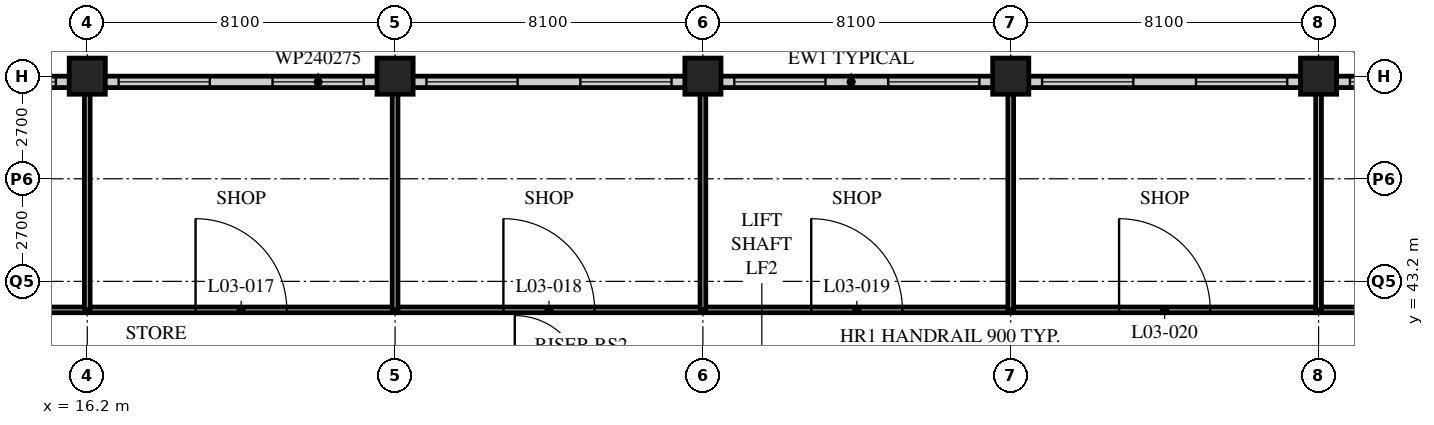
"""IFC4 building model, lengths in metres.
Left out: names, types, materials, properties, quantities, classifications, styles, units other than length and angle.
Written with IfcOpenShell. Run it as: python <this file> out.ifc"""

import sys

from ifc_helpers import new_model, si_unit, direction, frame, frame_2d, origin, origin_2d, place, context, subcontext, project, spatial, rectangle, hollow_rectangle, extrude, element, fill, save


model = new_model("IFC4")
c1 = context("Model", 3, precision=1e-05, world=origin(), true_north=direction((0.0, 1.0)))
c2 = subcontext(c1, "Body", "Model", "MODEL_VIEW")
j1 = project(units=[si_unit("LENGTHUNIT", "METRE"), si_unit("PLANEANGLEUNIT", "RADIAN")], contexts=[c1])
p1 = place(None, origin())
s1 = spatial("IfcSite", under=j1, at=p1, CompositionType="ELEMENT")
p2 = place(p1, origin())
s2 = spatial("IfcBuilding", under=s1, at=p2, CompositionType="ELEMENT")
p3 = place(p2, frame((0.0, 0.0, 16.8)))
s3 = spatial("IfcBuildingStorey", under=s2, at=p3, CompositionType="ELEMENT", Elevation=16.8)
for number, where, z_axis, x_axis in (
    (1, (16.2, 48.6, 0.0), (0.0, 0.0, 1.0), (1.0, 0.0, 0.0)),
    (2, (24.3, 48.6, 0.0), (0.0, 0.0, 1.0), (1.0, 0.0, 0.0)),
    (3, (32.4, 48.6, 0.0), (0.0, 0.0, 1.0), (1.0, 0.0, 0.0)),
    (4, (40.5, 48.6, 0.0), (0.0, 0.0, 1.0), (1.0, 0.0, 0.0)),
    (5, (48.6, 48.6, 0.0), (0.0, 0.0, 1.0), (1.0, 0.0, 0.0)),
):
    element("IfcColumn", number, at=place(p3, frame(where, z_axis=z_axis, x_axis=x_axis)), inside=s3, PredefinedType="COLUMN", context=c2, shape_type="SweptSolid", body=[
        extrude(hollow_rectangle(XDim=0.95, YDim=0.95, WallThickness=0.1, at=origin_2d()), origin(), (0.0, 0.0, 1.0), 5.4),
    ])
p4 = place(p3, frame((64.5, 48.45, 0.0), z_axis=(0.0, 0.0, 1.0), x_axis=(-1.0, 0.0, 0.0)))
e6 = element("IfcWall", 6, at=p4, inside=s3, PredefinedType="SOLIDWALL", context=c2, shape_type="SweptSolid", body=[
    extrude(rectangle(XDim=56.4, YDim=0.3, at=frame_2d((28.2, 0.0))), origin(), (0.0, 0.0, 1.0), 5.15),
])
p5 = place(p4, frame((0.525, 0.0, 1.0)))
e7 = element("IfcOpeningElement", 7, at=p5, cuts=e6, PredefinedType="OPENING", context=c2, shape_type="SweptSolid", body=[
    extrude(rectangle(XDim=2.4, YDim=2.75, at=frame_2d((1.2, 1.375))), frame((0.0, 0.16, 0.0), z_axis=(0.0, -1.0, 0.0), x_axis=(1.0, 0.0, 0.0)), (0.0, 0.0, 1.0), 0.32),
])
p6 = place(p4, frame((4.575, 0.0, 1.0)))
e8 = element("IfcOpeningElement", 8, at=p6, cuts=e6, PredefinedType="OPENING", context=c2, shape_type="SweptSolid", body=[
    extrude(rectangle(XDim=2.4, YDim=2.75, at=frame_2d((1.2, 1.375))), frame((0.0, 0.16, 0.0), z_axis=(0.0, -1.0, 0.0), x_axis=(1.0, 0.0, 0.0)), (0.0, 0.0, 1.0), 0.32),
])
p7 = place(p4, frame((8.625, 0.0, 1.0)))
e9 = element("IfcOpeningElement", 9, at=p7, cuts=e6, PredefinedType="OPENING", context=c2, shape_type="SweptSolid", body=[
    extrude(rectangle(XDim=2.4, YDim=2.75, at=frame_2d((1.2, 1.375))), frame((0.0, 0.16, 0.0), z_axis=(0.0, -1.0, 0.0), x_axis=(1.0, 0.0, 0.0)), (0.0, 0.0, 1.0), 0.32),
])
p8 = place(p4, frame((12.675, 0.0, 1.0)))
e10 = element("IfcOpeningElement", 10, at=p8, cuts=e6, PredefinedType="OPENING", context=c2, shape_type="SweptSolid", body=[
    extrude(rectangle(XDim=2.4, YDim=2.75, at=frame_2d((1.2, 1.375))), frame((0.0, 0.16, 0.0), z_axis=(0.0, -1.0, 0.0), x_axis=(1.0, 0.0, 0.0)), (0.0, 0.0, 1.0), 0.32),
])
p9 = place(p4, frame((16.725, 0.0, 1.0)))
e11 = element("IfcOpeningElement", 11, at=p9, cuts=e6, PredefinedType="OPENING", context=c2, shape_type="SweptSolid", body=[
    extrude(rectangle(XDim=2.4, YDim=2.75, at=frame_2d((1.2, 1.375))), frame((0.0, 0.16, 0.0), z_axis=(0.0, -1.0, 0.0), x_axis=(1.0, 0.0, 0.0)), (0.0, 0.0, 1.0), 0.32),
])
p10 = place(p4, frame((20.775, 0.0, 1.0)))
e12 = element("IfcOpeningElement", 12, at=p10, cuts=e6, PredefinedType="OPENING", context=c2, shape_type="SweptSolid", body=[
    extrude(rectangle(XDim=2.4, YDim=2.75, at=frame_2d((1.2, 1.375))), frame((0.0, 0.16, 0.0), z_axis=(0.0, -1.0, 0.0), x_axis=(1.0, 0.0, 0.0)), (0.0, 0.0, 1.0), 0.32),
])
p11 = place(p4, frame((24.825, 0.0, 1.0)))
e13 = element("IfcOpeningElement", 13, at=p11, cuts=e6, PredefinedType="OPENING", context=c2, shape_type="SweptSolid", body=[
    extrude(rectangle(XDim=2.4, YDim=2.75, at=frame_2d((1.2, 1.375))), frame((0.0, 0.16, 0.0), z_axis=(0.0, -1.0, 0.0), x_axis=(1.0, 0.0, 0.0)), (0.0, 0.0, 1.0), 0.32),
])
p12 = place(p4, frame((28.875, 0.0, 1.0)))
e14 = element("IfcOpeningElement", 14, at=p12, cuts=e6, PredefinedType="OPENING", context=c2, shape_type="SweptSolid", body=[
    extrude(rectangle(XDim=2.4, YDim=2.75, at=frame_2d((1.2, 1.375))), frame((0.0, 0.16, 0.0), z_axis=(0.0, -1.0, 0.0), x_axis=(1.0, 0.0, 0.0)), (0.0, 0.0, 1.0), 0.32),
])
p13 = place(p4, frame((32.925, 0.0, 1.0)))
e15 = element("IfcOpeningElement", 15, at=p13, cuts=e6, PredefinedType="OPENING", context=c2, shape_type="SweptSolid", body=[
    extrude(rectangle(XDim=2.4, YDim=2.75, at=frame_2d((1.2, 1.375))), frame((0.0, 0.16, 0.0), z_axis=(0.0, -1.0, 0.0), x_axis=(1.0, 0.0, 0.0)), (0.0, 0.0, 1.0), 0.32),
])
p14 = place(p4, frame((36.975, 0.0, 1.0)))
e16 = element("IfcOpeningElement", 16, at=p14, cuts=e6, PredefinedType="OPENING", context=c2, shape_type="SweptSolid", body=[
    extrude(rectangle(XDim=2.4, YDim=2.75, at=frame_2d((1.2, 1.375))), frame((0.0, 0.16, 0.0), z_axis=(0.0, -1.0, 0.0), x_axis=(1.0, 0.0, 0.0)), (0.0, 0.0, 1.0), 0.32),
])
p15 = place(p4, frame((41.025, 0.0, 1.0)))
e17 = element("IfcOpeningElement", 17, at=p15, cuts=e6, PredefinedType="OPENING", context=c2, shape_type="SweptSolid", body=[
    extrude(rectangle(XDim=2.4, YDim=2.75, at=frame_2d((1.2, 1.375))), frame((0.0, 0.16, 0.0), z_axis=(0.0, -1.0, 0.0), x_axis=(1.0, 0.0, 0.0)), (0.0, 0.0, 1.0), 0.32),
])
p16 = place(p4, frame((45.075, 0.0, 1.0)))
e18 = element("IfcOpeningElement", 18, at=p16, cuts=e6, PredefinedType="OPENING", context=c2, shape_type="SweptSolid", body=[
    extrude(rectangle(XDim=2.4, YDim=2.75, at=frame_2d((1.2, 1.375))), frame((0.0, 0.16, 0.0), z_axis=(0.0, -1.0, 0.0), x_axis=(1.0, 0.0, 0.0)), (0.0, 0.0, 1.0), 0.32),
])
p17 = place(p4, frame((49.125, 0.0, 1.0)))
e19 = element("IfcOpeningElement", 19, at=p17, cuts=e6, PredefinedType="OPENING", context=c2, shape_type="SweptSolid", body=[
    extrude(rectangle(XDim=2.4, YDim=2.75, at=frame_2d((1.2, 1.375))), frame((0.0, 0.16, 0.0), z_axis=(0.0, -1.0, 0.0), x_axis=(1.0, 0.0, 0.0)), (0.0, 0.0, 1.0), 0.32),
])
p18 = place(p4, frame((53.175, 0.0, 1.0)))
e20 = element("IfcOpeningElement", 20, at=p18, cuts=e6, PredefinedType="OPENING", context=c2, shape_type="SweptSolid", body=[
    extrude(rectangle(XDim=2.4, YDim=2.75, at=frame_2d((1.2, 1.375))), frame((0.0, 0.16, 0.0), z_axis=(0.0, -1.0, 0.0), x_axis=(1.0, 0.0, 0.0)), (0.0, 0.0, 1.0), 0.32),
])
p19 = place(p3, frame((8.1, 42.45, 0.0), z_axis=(0.0, 0.0, 1.0), x_axis=(1.0, 0.0, 0.0)))
e21 = element("IfcWall", 21, at=p19, inside=s3, PredefinedType="PARTITIONING", context=c2, shape_type="SweptSolid", body=[
    extrude(rectangle(XDim=48.6, YDim=0.15, at=frame_2d((24.3, 0.0))), origin(), (0.0, 0.0, 1.0), 5.15),
])
p20 = place(p19, frame((10.95, 0.0, 0.0)))
e22 = element("IfcOpeningElement", 22, at=p20, cuts=e21, PredefinedType="OPENING", context=c2, shape_type="SweptSolid", body=[
    extrude(rectangle(XDim=2.4, YDim=2.7, at=frame_2d((1.2, 1.35))), frame((0.0, 0.085, 0.0), z_axis=(0.0, -1.0, 0.0), x_axis=(1.0, 0.0, 0.0)), (0.0, 0.0, 1.0), 0.17),
])
p21 = place(p19, frame((19.05, 0.0, 0.0)))
e23 = element("IfcOpeningElement", 23, at=p21, cuts=e21, PredefinedType="OPENING", context=c2, shape_type="SweptSolid", body=[
    extrude(rectangle(XDim=2.4, YDim=2.7, at=frame_2d((1.2, 1.35))), frame((0.0, 0.085, 0.0), z_axis=(0.0, -1.0, 0.0), x_axis=(1.0, 0.0, 0.0)), (0.0, 0.0, 1.0), 0.17),
])
p22 = place(p19, frame((27.15, 0.0, 0.0)))
e24 = element("IfcOpeningElement", 24, at=p22, cuts=e21, PredefinedType="OPENING", context=c2, shape_type="SweptSolid", body=[
    extrude(rectangle(XDim=2.4, YDim=2.7, at=frame_2d((1.2, 1.35))), frame((0.0, 0.085, 0.0), z_axis=(0.0, -1.0, 0.0), x_axis=(1.0, 0.0, 0.0)), (0.0, 0.0, 1.0), 0.17),
])
p23 = place(p19, frame((35.25, 0.0, 0.0)))
e25 = element("IfcOpeningElement", 25, at=p23, cuts=e21, PredefinedType="OPENING", context=c2, shape_type="SweptSolid", body=[
    extrude(rectangle(XDim=2.4, YDim=2.7, at=frame_2d((1.2, 1.35))), frame((0.0, 0.085, 0.0), z_axis=(0.0, -1.0, 0.0), x_axis=(1.0, 0.0, 0.0)), (0.0, 0.0, 1.0), 0.17),
])
p24 = place(p19, frame((43.35, 0.0, 0.0)))
e26 = element("IfcOpeningElement", 26, at=p24, cuts=e21, PredefinedType="OPENING", context=c2, shape_type="SweptSolid", body=[
    extrude(rectangle(XDim=2.4, YDim=2.7, at=frame_2d((1.2, 1.35))), frame((0.0, 0.085, 0.0), z_axis=(0.0, -1.0, 0.0), x_axis=(1.0, 0.0, 0.0)), (0.0, 0.0, 1.0), 0.17),
])
p25 = place(p19, frame((2.85, 0.0, 0.0)))
e27 = element("IfcOpeningElement", 27, at=p25, cuts=e21, PredefinedType="OPENING", context=c2, shape_type="SweptSolid", body=[
    extrude(rectangle(XDim=2.4, YDim=2.7, at=frame_2d((1.2, 1.35))), frame((0.0, 0.085, 0.0), z_axis=(0.0, -1.0, 0.0), x_axis=(1.0, 0.0, 0.0)), (0.0, 0.0, 1.0), 0.17),
])
for number, where, z_axis, x_axis in (
    (28, (24.3, 42.45, 0.0), (0.0, 0.0, 1.0), (0.0, 1.0, 0.0)),
    (29, (32.4, 42.45, 0.0), (0.0, 0.0, 1.0), (0.0, 1.0, 0.0)),
    (30, (40.5, 42.45, 0.0), (0.0, 0.0, 1.0), (0.0, 1.0, 0.0)),
    (31, (48.6, 42.45, 0.0), (0.0, 0.0, 1.0), (0.0, 1.0, 0.0)),
    (32, (16.2, 42.45, 0.0), (0.0, 0.0, 1.0), (0.0, 1.0, 0.0)),
):
    element("IfcWall", number, at=place(p3, frame(where, z_axis=z_axis, x_axis=x_axis)), inside=s3, PredefinedType="PARTITIONING", context=c2, shape_type="SweptSolid", body=[
        extrude(rectangle(XDim=5.85, YDim=0.15, at=frame_2d((2.925, 0.0))), origin(), (0.0, 0.0, 1.0), 4.538),
    ])
p26 = place(p8, origin())
e33 = element("IfcWindow", 33, at=p26, inside=s3, PartitioningType="SINGLE_PANEL", PredefinedType="WINDOW", context=c2, shape_type="SweptSolid", body=[
    extrude(rectangle(XDim=2.4, YDim=2.75, at=frame_2d((1.2, 1.375))), frame((0.0, 0.03, 0.0), z_axis=(0.0, -1.0, 0.0), x_axis=(1.0, 0.0, 0.0)), (0.0, 0.0, 1.0), 0.06),
])
fill(e10, e33)
p27 = place(p9, origin())
e34 = element("IfcWindow", 34, at=p27, inside=s3, PartitioningType="SINGLE_PANEL", PredefinedType="WINDOW", context=c2, shape_type="SweptSolid", body=[
    extrude(rectangle(XDim=2.4, YDim=2.75, at=frame_2d((1.2, 1.375))), frame((0.0, 0.03, 0.0), z_axis=(0.0, -1.0, 0.0), x_axis=(1.0, 0.0, 0.0)), (0.0, 0.0, 1.0), 0.06),
])
fill(e11, e34)
p28 = place(p10, origin())
e35 = element("IfcWindow", 35, at=p28, inside=s3, PartitioningType="SINGLE_PANEL", PredefinedType="WINDOW", context=c2, shape_type="SweptSolid", body=[
    extrude(rectangle(XDim=2.4, YDim=2.75, at=frame_2d((1.2, 1.375))), frame((0.0, 0.03, 0.0), z_axis=(0.0, -1.0, 0.0), x_axis=(1.0, 0.0, 0.0)), (0.0, 0.0, 1.0), 0.06),
])
fill(e12, e35)
p29 = place(p11, origin())
e36 = element("IfcWindow", 36, at=p29, inside=s3, PartitioningType="SINGLE_PANEL", PredefinedType="WINDOW", context=c2, shape_type="SweptSolid", body=[
    extrude(rectangle(XDim=2.4, YDim=2.75, at=frame_2d((1.2, 1.375))), frame((0.0, 0.03, 0.0), z_axis=(0.0, -1.0, 0.0), x_axis=(1.0, 0.0, 0.0)), (0.0, 0.0, 1.0), 0.06),
])
fill(e13, e36)
p30 = place(p12, origin())
e37 = element("IfcWindow", 37, at=p30, inside=s3, PartitioningType="SINGLE_PANEL", PredefinedType="WINDOW", context=c2, shape_type="SweptSolid", body=[
    extrude(rectangle(XDim=2.4, YDim=2.75, at=frame_2d((1.2, 1.375))), frame((0.0, 0.03, 0.0), z_axis=(0.0, -1.0, 0.0), x_axis=(1.0, 0.0, 0.0)), (0.0, 0.0, 1.0), 0.06),
])
fill(e14, e37)
p31 = place(p13, origin())
e38 = element("IfcWindow", 38, at=p31, inside=s3, PartitioningType="SINGLE_PANEL", PredefinedType="WINDOW", context=c2, shape_type="SweptSolid", body=[
    extrude(rectangle(XDim=2.4, YDim=2.75, at=frame_2d((1.2, 1.375))), frame((0.0, 0.03, 0.0), z_axis=(0.0, -1.0, 0.0), x_axis=(1.0, 0.0, 0.0)), (0.0, 0.0, 1.0), 0.06),
])
fill(e15, e38)
p32 = place(p14, origin())
e39 = element("IfcWindow", 39, at=p32, inside=s3, PartitioningType="SINGLE_PANEL", PredefinedType="WINDOW", context=c2, shape_type="SweptSolid", body=[
    extrude(rectangle(XDim=2.4, YDim=2.75, at=frame_2d((1.2, 1.375))), frame((0.0, 0.03, 0.0), z_axis=(0.0, -1.0, 0.0), x_axis=(1.0, 0.0, 0.0)), (0.0, 0.0, 1.0), 0.06),
])
fill(e16, e39)
p33 = place(p15, origin())
e40 = element("IfcWindow", 40, at=p33, inside=s3, PartitioningType="SINGLE_PANEL", PredefinedType="WINDOW", context=c2, shape_type="SweptSolid", body=[
    extrude(rectangle(XDim=2.4, YDim=2.75, at=frame_2d((1.2, 1.375))), frame((0.0, 0.03, 0.0), z_axis=(0.0, -1.0, 0.0), x_axis=(1.0, 0.0, 0.0)), (0.0, 0.0, 1.0), 0.06),
])
fill(e17, e40)
p34 = place(p16, origin())
e41 = element("IfcWindow", 41, at=p34, inside=s3, PartitioningType="SINGLE_PANEL", PredefinedType="WINDOW", context=c2, shape_type="SweptSolid", body=[
    extrude(rectangle(XDim=2.4, YDim=2.75, at=frame_2d((1.2, 1.375))), frame((0.0, 0.03, 0.0), z_axis=(0.0, -1.0, 0.0), x_axis=(1.0, 0.0, 0.0)), (0.0, 0.0, 1.0), 0.06),
])
fill(e18, e41)
p35 = place(p17, origin())
e42 = element("IfcWindow", 42, at=p35, inside=s3, PartitioningType="SINGLE_PANEL", PredefinedType="WINDOW", context=c2, shape_type="SweptSolid", body=[
    extrude(rectangle(XDim=2.4, YDim=2.75, at=frame_2d((1.2, 1.375))), frame((0.0, 0.03, 0.0), z_axis=(0.0, -1.0, 0.0), x_axis=(1.0, 0.0, 0.0)), (0.0, 0.0, 1.0), 0.06),
])
fill(e19, e42)
p36 = place(p20, origin())
e43 = element("IfcDoor", 43, at=p36, inside=s3, OperationType="DOUBLE_DOOR_SINGLE_SWING", PredefinedType="DOOR", context=c2, shape_type="SweptSolid", body=[
    extrude(rectangle(XDim=2.4, YDim=2.7, at=frame_2d((1.2, 1.35))), frame((0.0, 0.025, 0.0), z_axis=(0.0, -1.0, 0.0), x_axis=(1.0, 0.0, 0.0)), (0.0, 0.0, 1.0), 0.05),
])
fill(e22, e43)
p37 = place(p21, origin())
e44 = element("IfcDoor", 44, at=p37, inside=s3, OperationType="DOUBLE_DOOR_SINGLE_SWING", PredefinedType="DOOR", context=c2, shape_type="SweptSolid", body=[
    extrude(rectangle(XDim=2.4, YDim=2.7, at=frame_2d((1.2, 1.35))), frame((0.0, 0.025, 0.0), z_axis=(0.0, -1.0, 0.0), x_axis=(1.0, 0.0, 0.0)), (0.0, 0.0, 1.0), 0.05),
])
fill(e23, e44)
p38 = place(p22, origin())
e45 = element("IfcDoor", 45, at=p38, inside=s3, OperationType="DOUBLE_DOOR_SINGLE_SWING", PredefinedType="DOOR", context=c2, shape_type="SweptSolid", body=[
    extrude(rectangle(XDim=2.4, YDim=2.7, at=frame_2d((1.2, 1.35))), frame((0.0, 0.025, 0.0), z_axis=(0.0, -1.0, 0.0), x_axis=(1.0, 0.0, 0.0)), (0.0, 0.0, 1.0), 0.05),
])
fill(e24, e45)
p39 = place(p23, origin())
e46 = element("IfcDoor", 46, at=p39, inside=s3, OperationType="DOUBLE_DOOR_SINGLE_SWING", PredefinedType="DOOR", context=c2, shape_type="SweptSolid", body=[
    extrude(rectangle(XDim=2.4, YDim=2.7, at=frame_2d((1.2, 1.35))), frame((0.0, 0.025, 0.0), z_axis=(0.0, -1.0, 0.0), x_axis=(1.0, 0.0, 0.0)), (0.0, 0.0, 1.0), 0.05),
])
fill(e25, e46)
save(model, sys.argv[1])
